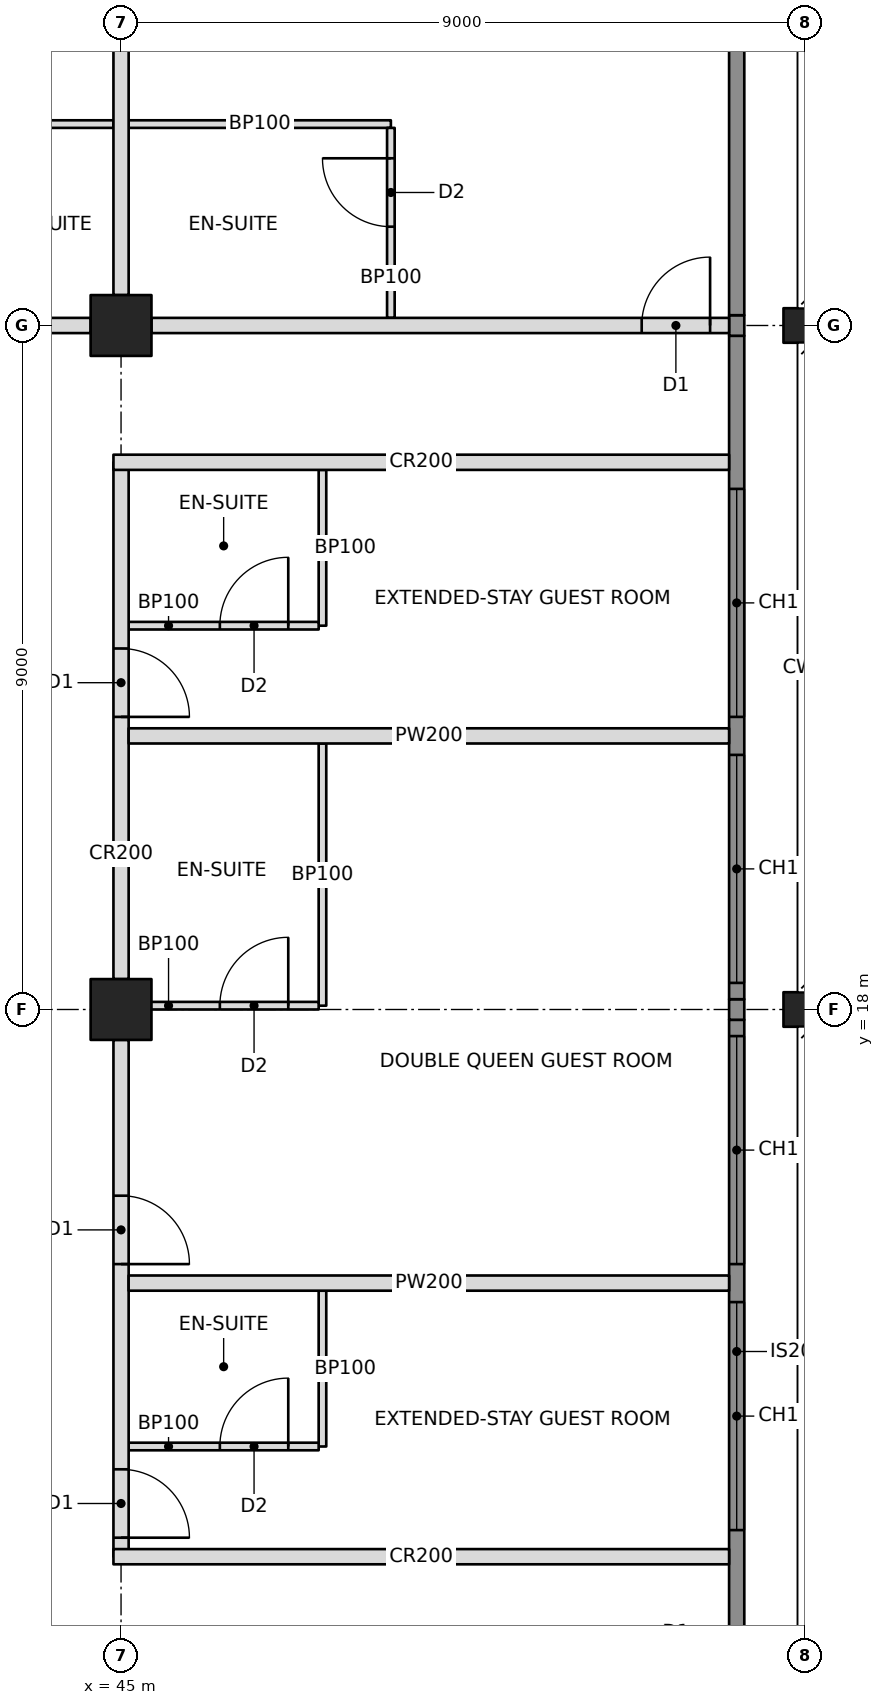
"""IFC4 building model, lengths in metres.
Left out: names, types, materials, properties, quantities, classifications, styles, units other than length and angle.
Written with IfcOpenShell. Run it as: python <this file> out.ifc"""

import sys

from ifc_helpers import new_model, si_unit, direction, frame, frame_2d, origin, origin_2d, place, context, subcontext, project, spatial, rectangle, hollow_rectangle, i_section, extrude, element, fill, save


model = new_model("IFC4")
c1 = context("Model", 3, precision=1e-05, world=origin(), true_north=direction((0.0, 1.0)))
c2 = subcontext(c1, "Body", "Model", "MODEL_VIEW")
j1 = project(units=[si_unit("LENGTHUNIT", "METRE"), si_unit("PLANEANGLEUNIT", "RADIAN")], contexts=[c1])
p1 = place(None, origin())
s1 = spatial("IfcSite", under=j1, at=p1, CompositionType="ELEMENT")
p2 = place(p1, origin())
s2 = spatial("IfcBuilding", under=s1, at=p2, CompositionType="ELEMENT")
p3 = place(p2, frame((0.0, 0.0, 82.4)))
s3 = spatial("IfcBuildingStorey", under=s2, at=p3, CompositionType="ELEMENT", Elevation=82.4)
for number, where, z_axis, x_axis in (
    (1, (45.0, 18.0, 0.0), (0.0, 0.0, 1.0), (0.0, 1.0, 0.0)),
    (2, (45.0, 27.0, 0.0), (0.0, 0.0, 1.0), (0.0, 1.0, 0.0)),
):
    element("IfcColumn", number, at=place(p3, frame(where, z_axis=z_axis, x_axis=x_axis)), inside=s3, PredefinedType="COLUMN", context=c2, shape_type="SweptSolid", body=[
        extrude(hollow_rectangle(XDim=0.8, YDim=0.8, WallThickness=0.09, at=origin_2d()), origin(), (0.0, 0.0, 1.0), 3.4),
    ])
for number, where, z_axis, x_axis in (
    (3, (54.0, 18.0, 0.0), (0.0, 0.0, 1.0), (0.0, 1.0, 0.0)),
    (4, (54.0, 27.0, 0.0), (0.0, 0.0, 1.0), (0.0, 1.0, 0.0)),
):
    element("IfcColumn", number, at=place(p3, frame(where, z_axis=z_axis, x_axis=x_axis)), inside=s3, PredefinedType="COLUMN", context=c2, shape_type="SweptSolid", body=[
        extrude(i_section(OverallWidth=0.455, OverallDepth=0.569, WebThickness=0.078, FlangeThickness=0.125, at=origin_2d()), origin(), (0.0, 0.0, 1.0), 3.4),
    ])
p4 = place(p3, frame((36.4, 27.0, 0.0), z_axis=(0.0, 0.0, 1.0), x_axis=(1.0, 0.0, 0.0)))
e5 = element("IfcWall", 5, at=p4, inside=s3, PredefinedType="PARTITIONING", context=c2, shape_type="SweptSolid", body=[
    extrude(rectangle(XDim=8.2, YDim=0.2, at=frame_2d((4.1, 0.0))), origin(), (0.0, 0.0, 1.0), 2.438),
])
p5 = place(p4, frame((2.95, 0.0, 0.0)))
e6 = element("IfcOpeningElement", 6, at=p5, cuts=e5, PredefinedType="OPENING", context=c2, shape_type="SweptSolid", body=[
    extrude(rectangle(XDim=0.9, YDim=2.1, at=frame_2d((0.45, 1.05))), frame((0.0, 0.11, 0.0), z_axis=(0.0, -1.0, 0.0), x_axis=(1.0, 0.0, 0.0)), (0.0, 0.0, 1.0), 0.22),
])
p6 = place(p4, frame((4.35, 0.0, 0.0)))
e7 = element("IfcOpeningElement", 7, at=p6, cuts=e5, PredefinedType="OPENING", context=c2, shape_type="SweptSolid", body=[
    extrude(rectangle(XDim=0.9, YDim=2.1, at=frame_2d((0.45, 1.05))), frame((0.0, 0.11, 0.0), z_axis=(0.0, -1.0, 0.0), x_axis=(1.0, 0.0, 0.0)), (0.0, 0.0, 1.0), 0.22),
])
p7 = place(p3, frame((45.4, 27.0, 0.0), z_axis=(0.0, 0.0, 1.0), x_axis=(1.0, 0.0, 0.0)))
e8 = element("IfcWall", 8, at=p7, inside=s3, PredefinedType="PARTITIONING", context=c2, shape_type="SweptSolid", body=[
    extrude(rectangle(XDim=7.6, YDim=0.2, at=frame_2d((3.8, 0.0))), origin(), (0.0, 0.0, 1.0), 2.438),
])
p8 = place(p7, frame((6.45, 0.0, 0.0)))
e9 = element("IfcOpeningElement", 9, at=p8, cuts=e8, PredefinedType="OPENING", context=c2, shape_type="SweptSolid", body=[
    extrude(rectangle(XDim=0.9, YDim=2.1, at=frame_2d((0.45, 1.05))), frame((0.0, 0.11, 0.0), z_axis=(0.0, -1.0, 0.0), x_axis=(1.0, 0.0, 0.0)), (0.0, 0.0, 1.0), 0.22),
])
p9 = place(p3, frame((45.0, 10.8, 0.0), z_axis=(0.0, 0.0, 1.0), x_axis=(0.0, 1.0, 0.0)))
e10 = element("IfcWall", 10, at=p9, inside=s3, PredefinedType="PARTITIONING", context=c2, shape_type="SweptSolid", body=[
    extrude(rectangle(XDim=6.8, YDim=0.2, at=frame_2d((3.4, 0.0))), origin(), (0.0, 0.0, 1.0), 2.438),
])
p10 = place(p9, frame((0.25, 0.0, 0.0)))
e11 = element("IfcOpeningElement", 11, at=p10, cuts=e10, PredefinedType="OPENING", context=c2, shape_type="SweptSolid", body=[
    extrude(rectangle(XDim=0.9, YDim=2.1, at=frame_2d((0.45, 1.05))), frame((0.0, 0.11, 0.0), z_axis=(0.0, -1.0, 0.0), x_axis=(1.0, 0.0, 0.0)), (0.0, 0.0, 1.0), 0.22),
])
p11 = place(p9, frame((3.85, 0.0, 0.0)))
e12 = element("IfcOpeningElement", 12, at=p11, cuts=e10, PredefinedType="OPENING", context=c2, shape_type="SweptSolid", body=[
    extrude(rectangle(XDim=0.9, YDim=2.1, at=frame_2d((0.45, 1.05))), frame((0.0, 0.11, 0.0), z_axis=(0.0, -1.0, 0.0), x_axis=(1.0, 0.0, 0.0)), (0.0, 0.0, 1.0), 0.22),
])
p12 = place(p3, frame((45.0, 18.4, 0.0), z_axis=(0.0, 0.0, 1.0), x_axis=(0.0, 1.0, 0.0)))
e13 = element("IfcWall", 13, at=p12, inside=s3, PredefinedType="PARTITIONING", context=c2, shape_type="SweptSolid", body=[
    extrude(rectangle(XDim=6.8, YDim=0.2, at=frame_2d((3.4, 0.0))), origin(), (0.0, 0.0, 1.0), 2.438),
])
p13 = place(p12, frame((3.45, 0.0, 0.0)))
e14 = element("IfcOpeningElement", 14, at=p13, cuts=e13, PredefinedType="OPENING", context=c2, shape_type="SweptSolid", body=[
    extrude(rectangle(XDim=0.9, YDim=2.1, at=frame_2d((0.45, 1.05))), frame((0.0, 0.11, 0.0), z_axis=(0.0, -1.0, 0.0), x_axis=(1.0, 0.0, 0.0)), (0.0, 0.0, 1.0), 0.22),
])
for number, where, z_axis, x_axis in (
    (15, (44.9, 10.8, 0.0), (0.0, 0.0, 1.0), (1.0, 0.0, 0.0)),
    (16, (44.9, 25.2, 0.0), (0.0, 0.0, 1.0), (1.0, 0.0, 0.0)),
):
    element("IfcWall", number, at=place(p3, frame(where, z_axis=z_axis, x_axis=x_axis)), inside=s3, PredefinedType="PARTITIONING", context=c2, shape_type="SweptSolid", body=[
        extrude(rectangle(XDim=8.1, YDim=0.2, at=frame_2d((4.05, 0.0))), origin(), (0.0, 0.0, 1.0), 2.438),
    ])
p14 = place(p3, frame((45.0, 27.4, 0.0), z_axis=(0.0, 0.0, 1.0), x_axis=(0.0, 1.0, 0.0)))
e17 = element("IfcWall", 17, at=p14, inside=s3, PredefinedType="PARTITIONING", context=c2, shape_type="SweptSolid", body=[
    extrude(rectangle(XDim=7.6, YDim=0.2, at=frame_2d((3.8, 0.0))), origin(), (0.0, 0.0, 1.0), 2.438),
])
p15 = place(p3, frame((41.95, 29.65, 0.0), z_axis=(0.0, 0.0, 1.0), x_axis=(1.0, 0.0, 0.0)))
e18 = element("IfcWall", 18, at=p15, inside=s3, PredefinedType="PARTITIONING", context=c2, shape_type="SweptSolid", body=[
    extrude(rectangle(XDim=2.95, YDim=0.1, at=frame_2d((1.475, 0.0))), origin(), (0.0, 0.0, 1.0), 2.438),
])
p16 = place(p3, frame((45.1, 29.65, 0.0), z_axis=(0.0, 0.0, 1.0), x_axis=(1.0, 0.0, 0.0)))
e19 = element("IfcWall", 19, at=p16, inside=s3, PredefinedType="PARTITIONING", context=c2, shape_type="SweptSolid", body=[
    extrude(rectangle(XDim=3.45, YDim=0.1, at=frame_2d((1.725, 0.0))), origin(), (0.0, 0.0, 1.0), 2.438),
])
p17 = place(p3, frame((48.55, 27.1, 0.0), z_axis=(0.0, 0.0, 1.0), x_axis=(0.0, 1.0, 0.0)))
e20 = element("IfcWall", 20, at=p17, inside=s3, PredefinedType="PARTITIONING", context=c2, shape_type="SweptSolid", body=[
    extrude(rectangle(XDim=2.5, YDim=0.1, at=frame_2d((1.25, 0.0))), origin(), (0.0, 0.0, 1.0), 2.438),
])
p18 = place(p17, frame((1.2, 0.0, 0.0)))
e21 = element("IfcOpeningElement", 21, at=p18, cuts=e20, PredefinedType="OPENING", context=c2, shape_type="SweptSolid", body=[
    extrude(rectangle(XDim=0.9, YDim=2.1, at=frame_2d((0.45, 1.05))), frame((0.0, 0.06, 0.0), z_axis=(0.0, -1.0, 0.0), x_axis=(1.0, 0.0, 0.0)), (0.0, 0.0, 1.0), 0.12),
])
for number, where, z_axis, x_axis in (
    (22, (45.1, 14.4, 0.0), (0.0, 0.0, 1.0), (1.0, 0.0, 0.0)),
    (23, (45.1, 21.6, 0.0), (0.0, 0.0, 1.0), (1.0, 0.0, 0.0)),
):
    element("IfcWall", number, at=place(p3, frame(where, z_axis=z_axis, x_axis=x_axis)), inside=s3, PredefinedType="PARTITIONING", context=c2, shape_type="SweptSolid", body=[
        extrude(rectangle(XDim=7.9, YDim=0.2, at=frame_2d((3.95, 0.0))), origin(), (0.0, 0.0, 1.0), 2.438),
    ])
p19 = place(p3, frame((47.65, 12.25, 0.0), z_axis=(0.0, 0.0, 1.0), x_axis=(0.0, 1.0, 0.0)))
e24 = element("IfcWall", 24, at=p19, inside=s3, PredefinedType="PARTITIONING", context=c2, shape_type="SweptSolid", body=[
    extrude(rectangle(XDim=2.05, YDim=0.1, at=frame_2d((1.025, 0.0))), origin(), (0.0, 0.0, 1.0), 3.2),
])
p20 = place(p3, frame((45.1, 12.25, 0.0), z_axis=(0.0, 0.0, 1.0), x_axis=(1.0, 0.0, 0.0)))
e25 = element("IfcWall", 25, at=p20, inside=s3, PredefinedType="PARTITIONING", context=c2, shape_type="SweptSolid", body=[
    extrude(rectangle(XDim=2.5, YDim=0.1, at=frame_2d((1.25, 0.0))), origin(), (0.0, 0.0, 1.0), 2.438),
])
p21 = place(p20, frame((1.2, 0.0, 0.0)))
e26 = element("IfcOpeningElement", 26, at=p21, cuts=e25, PredefinedType="OPENING", context=c2, shape_type="SweptSolid", body=[
    extrude(rectangle(XDim=0.9, YDim=2.1, at=frame_2d((0.45, 1.05))), frame((0.0, 0.06, 0.0), z_axis=(0.0, -1.0, 0.0), x_axis=(1.0, 0.0, 0.0)), (0.0, 0.0, 1.0), 0.12),
])
p22 = place(p3, frame((47.65, 18.05, 0.0), z_axis=(0.0, 0.0, 1.0), x_axis=(0.0, 1.0, 0.0)))
e27 = element("IfcWall", 27, at=p22, inside=s3, PredefinedType="PARTITIONING", context=c2, shape_type="SweptSolid", body=[
    extrude(rectangle(XDim=3.45, YDim=0.1, at=frame_2d((1.725, 0.0))), origin(), (0.0, 0.0, 1.0), 2.438),
])
p23 = place(p3, frame((45.1, 18.05, 0.0), z_axis=(0.0, 0.0, 1.0), x_axis=(1.0, 0.0, 0.0)))
e28 = element("IfcWall", 28, at=p23, inside=s3, PredefinedType="PARTITIONING", context=c2, shape_type="SweptSolid", body=[
    extrude(rectangle(XDim=2.5, YDim=0.1, at=frame_2d((1.25, 0.0))), origin(), (0.0, 0.0, 1.0), 2.438),
])
p24 = place(p23, frame((1.2, 0.0, 0.0)))
e29 = element("IfcOpeningElement", 29, at=p24, cuts=e28, PredefinedType="OPENING", context=c2, shape_type="SweptSolid", body=[
    extrude(rectangle(XDim=0.9, YDim=2.1, at=frame_2d((0.45, 1.05))), frame((0.0, 0.06, 0.0), z_axis=(0.0, -1.0, 0.0), x_axis=(1.0, 0.0, 0.0)), (0.0, 0.0, 1.0), 0.12),
])
p25 = place(p3, frame((47.65, 23.05, 0.0), z_axis=(0.0, 0.0, 1.0), x_axis=(0.0, 1.0, 0.0)))
e30 = element("IfcWall", 30, at=p25, inside=s3, PredefinedType="PARTITIONING", context=c2, shape_type="SweptSolid", body=[
    extrude(rectangle(XDim=2.05, YDim=0.1, at=frame_2d((1.025, 0.0))), origin(), (0.0, 0.0, 1.0), 3.2),
])
p26 = place(p3, frame((45.1, 23.05, 0.0), z_axis=(0.0, 0.0, 1.0), x_axis=(1.0, 0.0, 0.0)))
e31 = element("IfcWall", 31, at=p26, inside=s3, PredefinedType="PARTITIONING", context=c2, shape_type="SweptSolid", body=[
    extrude(rectangle(XDim=2.5, YDim=0.1, at=frame_2d((1.25, 0.0))), origin(), (0.0, 0.0, 1.0), 2.438),
])
p27 = place(p26, frame((1.2, 0.0, 0.0)))
e32 = element("IfcOpeningElement", 32, at=p27, cuts=e31, PredefinedType="OPENING", context=c2, shape_type="SweptSolid", body=[
    extrude(rectangle(XDim=0.9, YDim=2.1, at=frame_2d((0.45, 1.05))), frame((0.0, 0.06, 0.0), z_axis=(0.0, -1.0, 0.0), x_axis=(1.0, 0.0, 0.0)), (0.0, 0.0, 1.0), 0.12),
])
p28 = place(p3, frame((53.1, 9.135, 0.0), z_axis=(0.0, 0.0, 1.0), x_axis=(0.0, 1.0, 0.0)))
e33 = element("IfcWall", 33, at=p28, inside=s3, PredefinedType="SOLIDWALL", context=c2, shape_type="SweptSolid", body=[
    extrude(rectangle(XDim=8.729, YDim=0.2, at=frame_2d((4.365, 0.0))), origin(), (0.0, 0.0, 1.0), 3.2),
])
p29 = place(p28, frame((2.015, 0.0, 0.6)))
e34 = element("IfcOpeningElement", 34, at=p29, cuts=e33, PredefinedType="OPENING", context=c2, shape_type="SweptSolid", body=[
    extrude(rectangle(XDim=3.0, YDim=2.2, at=frame_2d((1.5, 1.1))), frame((0.0, 0.11, 0.0), z_axis=(0.0, -1.0, 0.0), x_axis=(1.0, 0.0, 0.0)), (0.0, 0.0, 1.0), 0.22),
])
p30 = place(p28, frame((5.515, 0.0, 0.6)))
e35 = element("IfcOpeningElement", 35, at=p30, cuts=e33, PredefinedType="OPENING", context=c2, shape_type="SweptSolid", body=[
    extrude(rectangle(XDim=3.0, YDim=2.2, at=frame_2d((1.5, 1.1))), frame((0.0, 0.11, 0.0), z_axis=(0.0, -1.0, 0.0), x_axis=(1.0, 0.0, 0.0)), (0.0, 0.0, 1.0), 0.22),
])
p31 = place(p3, frame((53.1, 17.865, 0.0), z_axis=(0.0, 0.0, 1.0), x_axis=(0.0, 1.0, 0.0)))
e36 = element("IfcWall", 36, at=p31, inside=s3, PredefinedType="SOLIDWALL", context=c2, shape_type="SweptSolid", body=[
    extrude(rectangle(XDim=0.271, YDim=0.2, at=frame_2d((0.135, 0.0))), origin(), (0.0, 0.0, 1.0), 2.438),
])
p32 = place(p3, frame((53.1, 18.135, 0.0), z_axis=(0.0, 0.0, 1.0), x_axis=(0.0, 1.0, 0.0)))
e37 = element("IfcWall", 37, at=p32, inside=s3, PredefinedType="SOLIDWALL", context=c2, shape_type="SweptSolid", body=[
    extrude(rectangle(XDim=8.729, YDim=0.2, at=frame_2d((4.365, 0.0))), origin(), (0.0, 0.0, 1.0), 3.2),
])
p33 = place(p32, frame((0.215, 0.0, 0.6)))
e38 = element("IfcOpeningElement", 38, at=p33, cuts=e37, PredefinedType="OPENING", context=c2, shape_type="SweptSolid", body=[
    extrude(rectangle(XDim=3.0, YDim=2.2, at=frame_2d((1.5, 1.1))), frame((0.0, 0.11, 0.0), z_axis=(0.0, -1.0, 0.0), x_axis=(1.0, 0.0, 0.0)), (0.0, 0.0, 1.0), 0.22),
])
p34 = place(p32, frame((3.715, 0.0, 0.6)))
e39 = element("IfcOpeningElement", 39, at=p34, cuts=e37, PredefinedType="OPENING", context=c2, shape_type="SweptSolid", body=[
    extrude(rectangle(XDim=3.0, YDim=2.2, at=frame_2d((1.5, 1.1))), frame((0.0, 0.11, 0.0), z_axis=(0.0, -1.0, 0.0), x_axis=(1.0, 0.0, 0.0)), (0.0, 0.0, 1.0), 0.22),
])
p35 = place(p3, frame((53.1, 26.865, 0.0), z_axis=(0.0, 0.0, 1.0), x_axis=(0.0, 1.0, 0.0)))
e40 = element("IfcWall", 40, at=p35, inside=s3, PredefinedType="SOLIDWALL", context=c2, shape_type="SweptSolid", body=[
    extrude(rectangle(XDim=0.271, YDim=0.2, at=frame_2d((0.135, 0.0))), origin(), (0.0, 0.0, 1.0), 2.438),
])
p36 = place(p3, frame((53.1, 27.135, 0.0), z_axis=(0.0, 0.0, 1.0), x_axis=(0.0, 1.0, 0.0)))
e41 = element("IfcWall", 41, at=p36, inside=s3, PredefinedType="SOLIDWALL", context=c2, shape_type="SweptSolid", body=[
    extrude(rectangle(XDim=4.257, YDim=0.2, at=frame_2d((2.129, 0.0))), origin(), (0.0, 0.0, 1.0), 3.2),
])
p37 = place(p29, origin())
e42 = element("IfcWindow", 42, at=p37, inside=s3, PartitioningType="TRIPLE_PANEL_VERTICAL", PredefinedType="WINDOW", context=c2, shape_type="SweptSolid", body=[
    extrude(rectangle(XDim=3.0, YDim=2.2, at=frame_2d((1.5, 1.1))), frame((0.0, 0.03, 0.0), z_axis=(0.0, -1.0, 0.0), x_axis=(1.0, 0.0, 0.0)), (0.0, 0.0, 1.0), 0.06),
])
fill(e34, e42)
p38 = place(p30, origin())
e43 = element("IfcWindow", 43, at=p38, inside=s3, PartitioningType="TRIPLE_PANEL_VERTICAL", PredefinedType="WINDOW", context=c2, shape_type="SweptSolid", body=[
    extrude(rectangle(XDim=3.0, YDim=2.2, at=frame_2d((1.5, 1.1))), frame((0.0, 0.03, 0.0), z_axis=(0.0, -1.0, 0.0), x_axis=(1.0, 0.0, 0.0)), (0.0, 0.0, 1.0), 0.06),
])
fill(e35, e43)
p39 = place(p33, origin())
e44 = element("IfcWindow", 44, at=p39, inside=s3, PartitioningType="TRIPLE_PANEL_VERTICAL", PredefinedType="WINDOW", context=c2, shape_type="SweptSolid", body=[
    extrude(rectangle(XDim=3.0, YDim=2.2, at=frame_2d((1.5, 1.1))), frame((0.0, 0.03, 0.0), z_axis=(0.0, -1.0, 0.0), x_axis=(1.0, 0.0, 0.0)), (0.0, 0.0, 1.0), 0.06),
])
fill(e38, e44)
p40 = place(p34, origin())
e45 = element("IfcWindow", 45, at=p40, inside=s3, PartitioningType="TRIPLE_PANEL_VERTICAL", PredefinedType="WINDOW", context=c2, shape_type="SweptSolid", body=[
    extrude(rectangle(XDim=3.0, YDim=2.2, at=frame_2d((1.5, 1.1))), frame((0.0, 0.03, 0.0), z_axis=(0.0, -1.0, 0.0), x_axis=(1.0, 0.0, 0.0)), (0.0, 0.0, 1.0), 0.06),
])
fill(e39, e45)
p41 = place(p18, origin())
e46 = element("IfcDoor", 46, at=p41, inside=s3, OperationType="SINGLE_SWING_RIGHT", PredefinedType="DOOR", context=c2, shape_type="SweptSolid", body=[
    extrude(rectangle(XDim=0.9, YDim=2.1, at=frame_2d((0.45, 1.05))), frame((0.0, 0.025, 0.0), z_axis=(0.0, -1.0, 0.0), x_axis=(1.0, 0.0, 0.0)), (0.0, 0.0, 1.0), 0.05),
])
fill(e21, e46)
p42 = place(p8, origin())
e47 = element("IfcDoor", 47, at=p42, inside=s3, OperationType="SINGLE_SWING_RIGHT", PredefinedType="DOOR", context=c2, shape_type="SweptSolid", body=[
    extrude(rectangle(XDim=0.9, YDim=2.1, at=frame_2d((0.45, 1.05))), frame((0.0, 0.025, 0.0), z_axis=(0.0, -1.0, 0.0), x_axis=(1.0, 0.0, 0.0)), (0.0, 0.0, 1.0), 0.05),
])
fill(e9, e47)
p43 = place(p21, origin())
e48 = element("IfcDoor", 48, at=p43, inside=s3, OperationType="SINGLE_SWING_RIGHT", PredefinedType="DOOR", context=c2, shape_type="SweptSolid", body=[
    extrude(rectangle(XDim=0.9, YDim=2.1, at=frame_2d((0.45, 1.05))), frame((0.0, 0.025, 0.0), z_axis=(0.0, -1.0, 0.0), x_axis=(1.0, 0.0, 0.0)), (0.0, 0.0, 1.0), 0.05),
])
fill(e26, e48)
p44 = place(p10, frame((0.9, 0.0, 0.0), z_axis=(0.0, 0.0, 1.0), x_axis=(-1.0, 0.0, 0.0)))
e49 = element("IfcDoor", 49, at=p44, inside=s3, OperationType="SINGLE_SWING_RIGHT", PredefinedType="DOOR", context=c2, shape_type="SweptSolid", body=[
    extrude(rectangle(XDim=0.9, YDim=2.1, at=frame_2d((0.45, 1.05))), frame((0.0, 0.025, 0.0), z_axis=(0.0, -1.0, 0.0), x_axis=(1.0, 0.0, 0.0)), (0.0, 0.0, 1.0), 0.05),
])
fill(e11, e49)
p45 = place(p24, origin())
e50 = element("IfcDoor", 50, at=p45, inside=s3, OperationType="SINGLE_SWING_RIGHT", PredefinedType="DOOR", context=c2, shape_type="SweptSolid", body=[
    extrude(rectangle(XDim=0.9, YDim=2.1, at=frame_2d((0.45, 1.05))), frame((0.0, 0.025, 0.0), z_axis=(0.0, -1.0, 0.0), x_axis=(1.0, 0.0, 0.0)), (0.0, 0.0, 1.0), 0.05),
])
fill(e29, e50)
p46 = place(p11, frame((0.9, 0.0, 0.0), z_axis=(0.0, 0.0, 1.0), x_axis=(-1.0, 0.0, 0.0)))
e51 = element("IfcDoor", 51, at=p46, inside=s3, OperationType="SINGLE_SWING_RIGHT", PredefinedType="DOOR", context=c2, shape_type="SweptSolid", body=[
    extrude(rectangle(XDim=0.9, YDim=2.1, at=frame_2d((0.45, 1.05))), frame((0.0, 0.025, 0.0), z_axis=(0.0, -1.0, 0.0), x_axis=(1.0, 0.0, 0.0)), (0.0, 0.0, 1.0), 0.05),
])
fill(e12, e51)
p47 = place(p27, origin())
e52 = element("IfcDoor", 52, at=p47, inside=s3, OperationType="SINGLE_SWING_RIGHT", PredefinedType="DOOR", context=c2, shape_type="SweptSolid", body=[
    extrude(rectangle(XDim=0.9, YDim=2.1, at=frame_2d((0.45, 1.05))), frame((0.0, 0.025, 0.0), z_axis=(0.0, -1.0, 0.0), x_axis=(1.0, 0.0, 0.0)), (0.0, 0.0, 1.0), 0.05),
])
fill(e32, e52)
p48 = place(p13, frame((0.9, 0.0, 0.0), z_axis=(0.0, 0.0, 1.0), x_axis=(-1.0, 0.0, 0.0)))
e53 = element("IfcDoor", 53, at=p48, inside=s3, OperationType="SINGLE_SWING_RIGHT", PredefinedType="DOOR", context=c2, shape_type="SweptSolid", body=[
    extrude(rectangle(XDim=0.9, YDim=2.1, at=frame_2d((0.45, 1.05))), frame((0.0, 0.025, 0.0), z_axis=(0.0, -1.0, 0.0), x_axis=(1.0, 0.0, 0.0)), (0.0, 0.0, 1.0), 0.05),
])
fill(e14, e53)
save(model, sys.argv[1])
